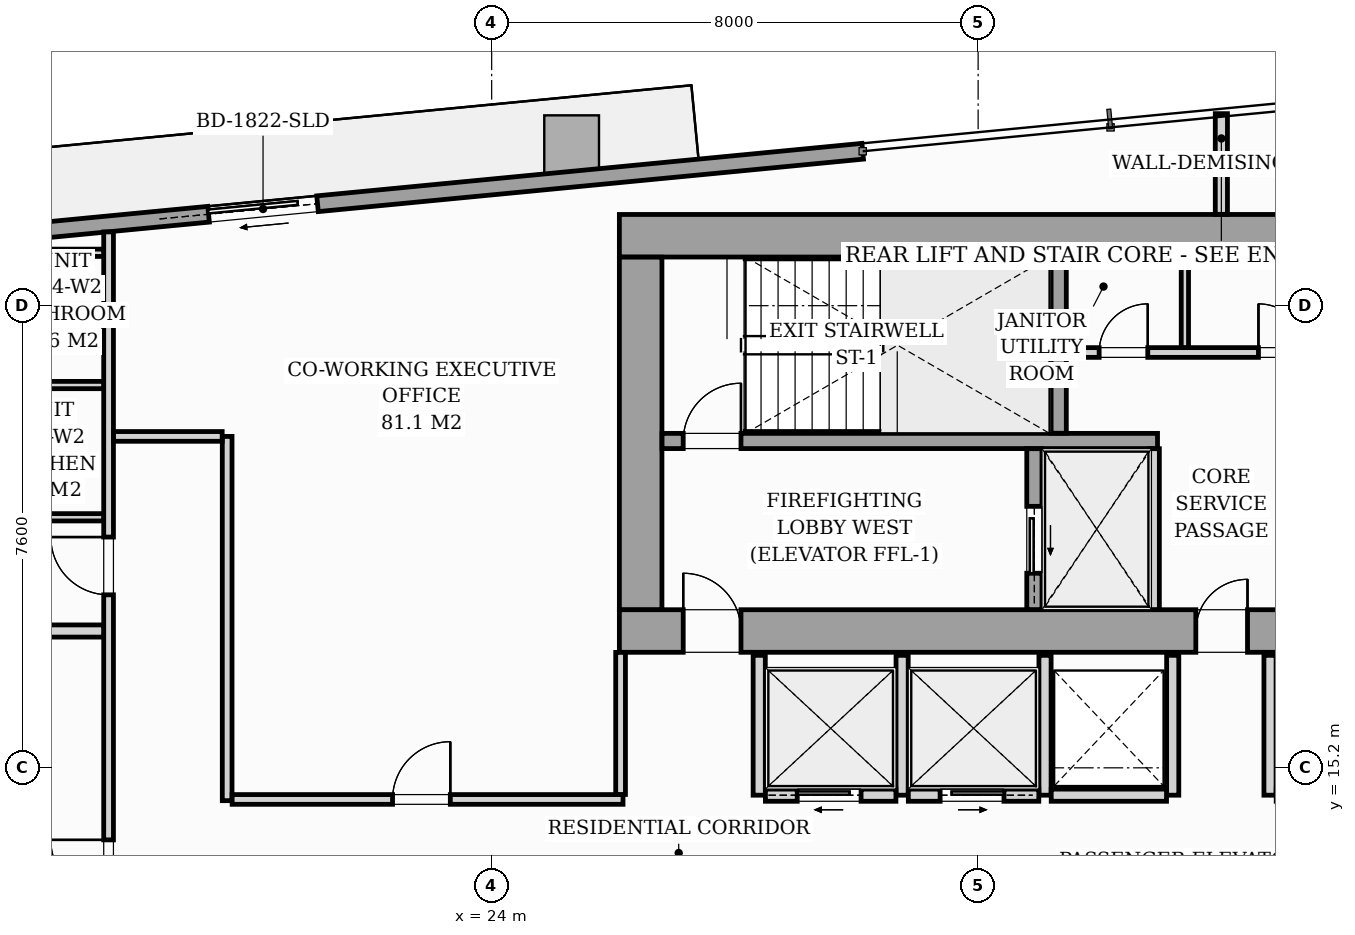
"""IFC4 building model, lengths in metres.
Left out: names, types, materials, properties, quantities, classifications, styles, units other than length and angle.
Written with IfcOpenShell. Run it as: python <this file> out.ifc"""

import sys

from ifc_helpers import new_model, si_unit, direction, frame, frame_2d, origin, origin_2d, place, context, subcontext, project, spatial, rectangle, i_section, extrude, source, transform, mapped, element, fill, save


model = new_model("IFC4")
c1 = context("Model", 3, precision=1e-05, world=origin(), true_north=direction((0.0, 1.0)))
c2 = subcontext(c1, "Body", "Model", "MODEL_VIEW")
j1 = project(units=[si_unit("LENGTHUNIT", "METRE"), si_unit("PLANEANGLEUNIT", "RADIAN")], contexts=[c1])
p1 = place(None, origin())
s1 = spatial("IfcSite", under=j1, at=p1, CompositionType="ELEMENT")
p2 = place(p1, origin())
s2 = spatial("IfcBuilding", under=s1, at=p2, CompositionType="ELEMENT")
p3 = place(p2, frame((0.0, 0.0, 87.4)))
s3 = spatial("IfcBuildingStorey", under=s2, at=p3, CompositionType="ELEMENT", Elevation=87.4)
m1 = source(origin(), c2, "Body", "SweptSolid", [
    extrude(i_section(OverallWidth=0.427, OverallDepth=0.483, WebThickness=0.051, FlangeThickness=0.082, FilletRadius=0.018, at=origin_2d()), origin(), (0.0, 0.0, 1.0), 3.196),
])
for number, where, z_axis, x_axis in (
    (1, (26.4, 17.4, 0.002), (0.0, 0.0, 1.0), (1.0, 0.0, 0.0)),
    (2, (33.12, 17.4, 0.002), (0.0, 0.0, 1.0), (1.0, 0.0, 0.0)),
    (3, (26.4, 24.0, 0.002), (0.0, 0.0, 1.0), (1.0, 0.0, 0.0)),
    (4, (33.12, 24.0, 0.002), (0.0, 0.0, 1.0), (1.0, 0.0, 0.0)),
):
    element("IfcColumn", number, at=place(p3, frame(where, z_axis=z_axis, x_axis=x_axis)), inside=s3, PredefinedType="PILASTER", context=c2, shape_type="MappedRepresentation", body=[
        mapped(m1, transform((0.0, 0.0, 0.0), scale=1.0)),
    ])
m2 = source(origin(), c2, "Body", "SweptSolid", [
    extrude(rectangle(XDim=0.9, YDim=1.1, at=origin_2d()), origin(), (0.0, 0.0, 1.0), 3.196),
])
p4 = place(p3, frame((25.315, 25.38, 0.002), z_axis=(0.0, 0.0, 1.0), x_axis=(0.995396198367, 0.09584575252, 0.0)))
e5 = element("IfcColumn", 5, at=p4, inside=s3, PredefinedType="COLUMN", context=c2, shape_type="MappedRepresentation", body=[
    mapped(m2, transform((0.0, 0.0, 0.0), scale=1.0)),
])
p5 = place(p3, frame((11.08, 23.508, 0.0), z_axis=(0.0, 0.0, 1.0), x_axis=(0.995396638587, 0.095841180552, 0.0)))
e6 = element("IfcWall", 6, at=p5, inside=s3, PredefinedType="STANDARD", context=c2, shape_type="SweptSolid", body=[
    extrude(rectangle(XDim=19.11, YDim=0.26, at=frame_2d((9.555, 0.0))), origin(), (0.0, 0.0, 1.0), 2.94),
])
p6 = place(p5, frame((8.303, 0.0, 0.0)))
e7 = element("IfcOpeningElement", 7, at=p6, cuts=e6, PredefinedType="OPENING", context=c2, shape_type="SweptSolid", body=[
    extrude(rectangle(XDim=1.8, YDim=2.06, at=frame_2d((0.9, 1.03))), frame((0.0, 0.14, 0.0), z_axis=(0.0, -1.0, 0.0), x_axis=(1.0, 0.0, 0.0)), (0.0, 0.0, 1.0), 0.28),
])
p7 = place(p5, frame((2.05, 0.0, 0.65)))
e8 = element("IfcOpeningElement", 8, at=p7, cuts=e6, PredefinedType="OPENING", context=c2, shape_type="SweptSolid", body=[
    extrude(rectangle(XDim=1.6, YDim=1.5, at=frame_2d((0.8, 0.75))), frame((0.0, 0.14, 0.0), z_axis=(0.0, -1.0, 0.0), x_axis=(1.0, 0.0, 0.0)), (0.0, 0.0, 1.0), 0.28),
])
p8 = place(p3, frame((26.1, 17.45, 0.0), z_axis=(0.0, 0.0, 1.0), x_axis=(1.0, 0.0, 0.0)))
e9 = element("IfcWall", 9, at=p8, inside=s3, PredefinedType="SHEAR", context=c2, shape_type="SweptSolid", body=[
    extrude(rectangle(XDim=19.8, YDim=0.7, at=frame_2d((9.9, 0.0))), origin(), (0.0, 0.0, 1.0), 3.2),
])
p9 = place(p8, frame((1.05, 0.0, 0.0)))
e10 = element("IfcOpeningElement", 10, at=p9, cuts=e9, PredefinedType="OPENING", context=c2, shape_type="SweptSolid", body=[
    extrude(rectangle(XDim=0.95, YDim=2.06, at=frame_2d((0.475, 1.03))), frame((0.0, 0.36, 0.0), z_axis=(0.0, -1.0, 0.0), x_axis=(1.0, 0.0, 0.0)), (0.0, 0.0, 1.0), 0.72),
])
p10 = place(p8, frame((9.48, 0.0, 0.0)))
e11 = element("IfcOpeningElement", 11, at=p10, cuts=e9, PredefinedType="OPENING", context=c2, shape_type="SweptSolid", body=[
    extrude(rectangle(XDim=0.85, YDim=2.0, at=frame_2d((0.425, 1.0))), frame((0.0, 0.36, 0.0), z_axis=(0.0, -1.0, 0.0), x_axis=(1.0, 0.0, 0.0)), (0.0, 0.0, 1.0), 0.72),
])
p11 = place(p8, frame((17.65, 0.0, 0.0)))
e12 = element("IfcOpeningElement", 12, at=p11, cuts=e9, PredefinedType="OPENING", context=c2, shape_type="SweptSolid", body=[
    extrude(rectangle(XDim=0.95, YDim=2.06, at=frame_2d((0.475, 1.03))), frame((0.0, 0.36, 0.0), z_axis=(0.0, -1.0, 0.0), x_axis=(1.0, 0.0, 0.0)), (0.0, 0.0, 1.0), 0.72),
])
p12 = place(p3, frame((26.1, 23.95, 0.0), z_axis=(0.0, 0.0, 1.0), x_axis=(1.0, 0.0, 0.0)))
e13 = element("IfcWall", 13, at=p12, inside=s3, PredefinedType="SHEAR", context=c2, shape_type="SweptSolid", body=[
    extrude(rectangle(XDim=19.8, YDim=0.7, at=frame_2d((9.9, 0.0))), origin(), (0.0, 0.0, 1.0), 3.2),
])
p13 = place(p3, frame((26.45, 17.802, 0.0), z_axis=(0.0, 0.0, 1.0), x_axis=(0.0, 1.0, 0.0)))
e14 = element("IfcWall", 14, at=p13, inside=s3, PredefinedType="SHEAR", context=c2, shape_type="SweptSolid", body=[
    extrude(rectangle(XDim=5.796, YDim=0.7, at=frame_2d((2.898, 0.0))), origin(), (0.0, 0.0, 1.0), 3.2),
])
p14 = place(p3, frame((26.802, 20.575, 0.0), z_axis=(0.0, 0.0, 1.0), x_axis=(1.0, 0.0, 0.0)))
e15 = element("IfcWall", 15, at=p14, inside=s3, PredefinedType="SOLIDWALL", context=c2, shape_type="SweptSolid", body=[
    extrude(rectangle(XDim=8.148, YDim=0.25, at=frame_2d((4.074, 0.0))), origin(), (0.0, 0.0, 1.0), 3.2),
])
p15 = place(p14, frame((0.348, 0.0, 0.0)))
e16 = element("IfcOpeningElement", 16, at=p15, cuts=e15, PredefinedType="OPENING", context=c2, shape_type="SweptSolid", body=[
    extrude(rectangle(XDim=0.95, YDim=2.06, at=frame_2d((0.475, 1.03))), frame((0.0, 0.135, 0.0), z_axis=(0.0, -1.0, 0.0), x_axis=(1.0, 0.0, 0.0)), (0.0, 0.0, 1.0), 0.27),
])
p16 = place(p3, frame((33.325, 20.702, 0.0), z_axis=(0.0, 0.0, 1.0), x_axis=(0.0, 1.0, 0.0)))
e17 = element("IfcWall", 17, at=p16, inside=s3, PredefinedType="SOLIDWALL", context=c2, shape_type="SweptSolid", body=[
    extrude(rectangle(XDim=2.896, YDim=0.25, at=frame_2d((1.448, 0.0))), origin(), (0.0, 0.0, 1.0), 3.2),
])
p17 = place(p3, frame((32.925, 17.802, 0.0), z_axis=(0.0, 0.0, 1.0), x_axis=(0.0, 1.0, 0.0)))
e18 = element("IfcWall", 18, at=p17, inside=s3, PredefinedType="SOLIDWALL", context=c2, shape_type="SweptSolid", body=[
    extrude(rectangle(XDim=2.646, YDim=0.25, at=frame_2d((1.323, 0.0))), origin(), (0.0, 0.0, 1.0), 3.2),
])
p18 = place(p17, frame((0.598, 0.0, 0.0)))
e19 = element("IfcOpeningElement", 19, at=p18, cuts=e18, PredefinedType="OPENING", context=c2, shape_type="SweptSolid", body=[
    extrude(rectangle(XDim=1.1, YDim=2.08, at=frame_2d((0.55, 1.04))), frame((0.0, 0.135, 0.0), z_axis=(0.0, -1.0, 0.0), x_axis=(1.0, 0.0, 0.0)), (0.0, 0.0, 1.0), 0.27),
])
p19 = place(p3, frame((34.9, 17.802, 0.0), z_axis=(0.0, 0.0, 1.0), x_axis=(0.0, 1.0, 0.0)))
e20 = element("IfcWall", 20, at=p19, inside=s3, PredefinedType="PARTITIONING", context=c2, shape_type="SweptSolid", body=[
    extrude(rectangle(XDim=2.646, YDim=0.16, at=frame_2d((1.323, 0.0))), origin(), (0.0, 0.0, 1.0), 2.94),
])
p20 = place(p3, frame((33.452, 22.03, 0.0), z_axis=(0.0, 0.0, 1.0), x_axis=(1.0, 0.0, 0.0)))
e21 = element("IfcWall", 21, at=p20, inside=s3, PredefinedType="PARTITIONING", context=c2, shape_type="SweptSolid", body=[
    extrude(rectangle(XDim=5.096, YDim=0.16, at=frame_2d((2.548, 0.0))), origin(), (0.0, 0.0, 1.0), 2.94),
])
p21 = place(p20, frame((0.538, 0.0, 0.0)))
e22 = element("IfcOpeningElement", 22, at=p21, cuts=e21, PredefinedType="OPENING", context=c2, shape_type="SweptSolid", body=[
    extrude(rectangle(XDim=0.8, YDim=2.05, at=frame_2d((0.4, 1.025))), frame((0.0, 0.09, 0.0), z_axis=(0.0, -1.0, 0.0), x_axis=(1.0, 0.0, 0.0)), (0.0, 0.0, 1.0), 0.18),
])
p22 = place(p20, frame((3.158, 0.0, 0.0)))
e23 = element("IfcOpeningElement", 23, at=p22, cuts=e21, PredefinedType="OPENING", context=c2, shape_type="SweptSolid", body=[
    extrude(rectangle(XDim=0.8, YDim=2.05, at=frame_2d((0.4, 1.025))), frame((0.0, 0.09, 0.0), z_axis=(0.0, -1.0, 0.0), x_axis=(1.0, 0.0, 0.0)), (0.0, 0.0, 1.0), 0.18),
])
p23 = place(p3, frame((35.4, 22.112, 0.0), z_axis=(0.0, 0.0, 1.0), x_axis=(0.0, 1.0, 0.0)))
e24 = element("IfcWall", 24, at=p23, inside=s3, PredefinedType="PARTITIONING", context=c2, shape_type="SweptSolid", body=[
    extrude(rectangle(XDim=1.486, YDim=0.12, at=frame_2d((0.743, 0.0))), origin(), (0.0, 0.0, 1.0), 2.94),
])
for number, where, z_axis, x_axis in (
    (25, (28.4, 14.75, 0.0), (0.0, 0.0, 1.0), (0.0, 1.0, 0.0)),
    (26, (30.75, 14.75, 0.0), (0.0, 0.0, 1.0), (0.0, 1.0, 0.0)),
    (27, (33.1, 14.75, 0.0), (0.0, 0.0, 1.0), (0.0, 1.0, 0.0)),
):
    element("IfcWall", number, at=place(p3, frame(where, z_axis=z_axis, x_axis=x_axis)), inside=s3, PredefinedType="PARTITIONING", context=c2, shape_type="SweptSolid", body=[
        extrude(rectangle(XDim=2.3, YDim=0.2, at=frame_2d((1.15, 0.0))), origin(), (0.0, 0.0, 1.0), 2.94),
    ])
p24 = place(p3, frame((28.502, 14.75, 0.0), z_axis=(0.0, 0.0, 1.0), x_axis=(1.0, 0.0, 0.0)))
e28 = element("IfcWall", 28, at=p24, inside=s3, PredefinedType="PARTITIONING", context=c2, shape_type="SweptSolid", body=[
    extrude(rectangle(XDim=2.146, YDim=0.2, at=frame_2d((1.073, 0.0))), origin(), (0.0, 0.0, 1.0), 2.94),
])
p25 = place(p24, frame((0.523, 0.0, 0.0)))
e29 = element("IfcOpeningElement", 29, at=p25, cuts=e28, PredefinedType="OPENING", context=c2, shape_type="SweptSolid", body=[
    extrude(rectangle(XDim=1.05, YDim=2.08, at=frame_2d((0.525, 1.04))), frame((0.0, 0.11, 0.0), z_axis=(0.0, -1.0, 0.0), x_axis=(1.0, 0.0, 0.0)), (0.0, 0.0, 1.0), 0.22),
])
p26 = place(p3, frame((30.852, 14.75, 0.0), z_axis=(0.0, 0.0, 1.0), x_axis=(1.0, 0.0, 0.0)))
e30 = element("IfcWall", 30, at=p26, inside=s3, PredefinedType="PARTITIONING", context=c2, shape_type="SweptSolid", body=[
    extrude(rectangle(XDim=2.146, YDim=0.2, at=frame_2d((1.073, 0.0))), origin(), (0.0, 0.0, 1.0), 2.94),
])
p27 = place(p26, frame((0.523, 0.0, 0.0)))
e31 = element("IfcOpeningElement", 31, at=p27, cuts=e30, PredefinedType="OPENING", context=c2, shape_type="SweptSolid", body=[
    extrude(rectangle(XDim=1.05, YDim=2.08, at=frame_2d((0.525, 1.04))), frame((0.0, 0.11, 0.0), z_axis=(0.0, -1.0, 0.0), x_axis=(1.0, 0.0, 0.0)), (0.0, 0.0, 1.0), 0.22),
])
p28 = place(p3, frame((35.2, 14.75, 0.0), z_axis=(0.0, 0.0, 1.0), x_axis=(0.0, 1.0, 0.0)))
e32 = element("IfcWall", 32, at=p28, inside=s3, PredefinedType="PARTITIONING", context=c2, shape_type="SweptSolid", body=[
    extrude(rectangle(XDim=2.3, YDim=0.2, at=frame_2d((1.15, 0.0))), origin(), (0.0, 0.0, 1.0), 2.94),
])
p29 = place(p3, frame((33.202, 14.75, 0.0), z_axis=(0.0, 0.0, 1.0), x_axis=(1.0, 0.0, 0.0)))
e33 = element("IfcWall", 33, at=p29, inside=s3, PredefinedType="PARTITIONING", context=c2, shape_type="SweptSolid", body=[
    extrude(rectangle(XDim=1.896, YDim=0.2, at=frame_2d((0.948, 0.0))), origin(), (0.0, 0.0, 1.0), 2.94),
])
p30 = place(p3, frame((36.8, 14.75, 0.0), z_axis=(0.0, 0.0, 1.0), x_axis=(0.0, 1.0, 0.0)))
e34 = element("IfcWall", 34, at=p30, inside=s3, PredefinedType="PARTITIONING", context=c2, shape_type="SweptSolid", body=[
    extrude(rectangle(XDim=2.3, YDim=0.2, at=frame_2d((1.15, 0.0))), origin(), (0.0, 0.0, 1.0), 2.94),
])
p31 = place(p3, frame((17.7, 12.572, 0.0), z_axis=(0.0, 0.0, 1.0), x_axis=(0.0, 1.0, 0.0)))
e35 = element("IfcWall", 35, at=p31, inside=s3, PredefinedType="PARTITIONING", context=c2, shape_type="SweptSolid", body=[
    extrude(rectangle(XDim=11.441, YDim=0.16, at=frame_2d((5.72, 0.0))), origin(), (0.0, 0.0, 1.0), 2.94),
])
p32 = place(p31, frame((0.493, 0.0, 0.0)))
e36 = element("IfcOpeningElement", 36, at=p32, cuts=e35, PredefinedType="OPENING", context=c2, shape_type="SweptSolid", body=[
    extrude(rectangle(XDim=0.95, YDim=2.06, at=frame_2d((0.475, 1.03))), frame((0.0, 0.09, 0.0), z_axis=(0.0, -1.0, 0.0), x_axis=(1.0, 0.0, 0.0)), (0.0, 0.0, 1.0), 0.18),
])
p33 = place(p31, frame((5.473, 0.0, 0.0)))
e37 = element("IfcOpeningElement", 37, at=p33, cuts=e35, PredefinedType="OPENING", context=c2, shape_type="SweptSolid", body=[
    extrude(rectangle(XDim=0.95, YDim=2.06, at=frame_2d((0.475, 1.03))), frame((0.0, 0.09, 0.0), z_axis=(0.0, -1.0, 0.0), x_axis=(1.0, 0.0, 0.0)), (0.0, 0.0, 1.0), 0.18),
])
p34 = place(p3, frame((36.0, 24.302, 0.0), z_axis=(0.0, 0.0, 1.0), x_axis=(0.0, 1.0, 0.0)))
e38 = element("IfcWall", 38, at=p34, inside=s3, PredefinedType="PARTITIONING", context=c2, shape_type="SweptSolid", body=[
    extrude(rectangle(XDim=1.656, YDim=0.2, at=frame_2d((0.828, 0.0))), origin(), (0.0, 0.0, 1.0), 2.94),
])
p35 = place(p3, frame((9.232, 17.45, 0.0), z_axis=(0.0, 0.0, 1.0), x_axis=(1.0, 0.0, 0.0)))
e39 = element("IfcWall", 39, at=p35, inside=s3, PredefinedType="PARTITIONING", context=c2, shape_type="SweptSolid", body=[
    extrude(rectangle(XDim=8.386, YDim=0.2, at=frame_2d((4.193, 0.0))), origin(), (0.0, 0.0, 1.0), 2.94),
])
for number, where, z_axis, x_axis in (
    (40, (15.362, 21.495, 0.0), (0.0, 0.0, 1.0), (1.0, 0.0, 0.0)),
    (41, (15.362, 19.32, 0.0), (0.0, 0.0, 1.0), (1.0, 0.0, 0.0)),
):
    element("IfcWall", number, at=place(p3, frame(where, z_axis=z_axis, x_axis=x_axis)), inside=s3, PredefinedType="PARTITIONING", context=c2, shape_type="SweptSolid", body=[
        extrude(rectangle(XDim=2.256, YDim=0.12, at=frame_2d((1.128, 0.0))), origin(), (0.0, 0.0, 1.0), 2.94),
    ])
p36 = place(p3, frame((15.362, 23.67, 0.0), z_axis=(0.0, 0.0, 1.0), x_axis=(1.0, 0.0, 0.0)))
e42 = element("IfcWall", 42, at=p36, inside=s3, PredefinedType="PARTITIONING", context=c2, shape_type="SweptSolid", body=[
    extrude(rectangle(XDim=2.256, YDim=0.12, at=frame_2d((1.128, 0.0))), origin(), (0.0, 0.0, 1.0), 2.31),
])
p37 = place(p3, frame((19.65, 14.66, 0.0), z_axis=(0.0, 0.0, 1.0), x_axis=(0.0, 1.0, 0.0)))
e43 = element("IfcWall", 43, at=p37, inside=s3, PredefinedType="PARTITIONING", context=c2, shape_type="SweptSolid", body=[
    extrude(rectangle(XDim=5.99, YDim=0.16, at=frame_2d((2.995, 0.0))), origin(), (0.0, 0.0, 1.0), 2.94),
])
p38 = place(p3, frame((17.782, 20.65, 0.0), z_axis=(0.0, 0.0, 1.0), x_axis=(1.0, 0.0, 0.0)))
e44 = element("IfcWall", 44, at=p38, inside=s3, PredefinedType="PARTITIONING", context=c2, shape_type="SweptSolid", body=[
    extrude(rectangle(XDim=1.786, YDim=0.16, at=frame_2d((0.893, 0.0))), origin(), (0.0, 0.0, 1.0), 2.94),
])
p39 = place(p3, frame((19.732, 14.68, 0.0), z_axis=(0.0, 0.0, 1.0), x_axis=(1.0, 0.0, 0.0)))
e45 = element("IfcWall", 45, at=p39, inside=s3, PredefinedType="PARTITIONING", context=c2, shape_type="SweptSolid", body=[
    extrude(rectangle(XDim=6.428, YDim=0.16, at=frame_2d((3.214, 0.0))), origin(), (0.0, 0.0, 1.0), 2.94),
])
p40 = place(p39, frame((2.638, 0.0, 0.0)))
e46 = element("IfcOpeningElement", 46, at=p40, cuts=e45, PredefinedType="OPENING", context=c2, shape_type="SweptSolid", body=[
    extrude(rectangle(XDim=0.95, YDim=2.06, at=frame_2d((0.475, 1.03))), frame((0.0, 0.09, 0.0), z_axis=(0.0, -1.0, 0.0), x_axis=(1.0, 0.0, 0.0)), (0.0, 0.0, 1.0), 0.18),
])
p41 = place(p3, frame((26.12, 14.762, 0.0), z_axis=(0.0, 0.0, 1.0), x_axis=(0.0, 1.0, 0.0)))
e47 = element("IfcWall", 47, at=p41, inside=s3, PredefinedType="PARTITIONING", context=c2, shape_type="SweptSolid", body=[
    extrude(rectangle(XDim=2.336, YDim=0.16, at=frame_2d((1.168, 0.0))), origin(), (0.0, 0.0, 1.0), 2.94),
])
m3 = source(origin(), c2, "Body", "SweptSolid", [
    extrude(rectangle(XDim=1.8, YDim=2.06, at=frame_2d((0.9, 1.03))), frame((0.0, 0.025, 0.0), z_axis=(0.0, -1.0, 0.0), x_axis=(1.0, 0.0, 0.0)), (0.0, 0.0, 1.0), 0.05),
])
p42 = place(p6, origin())
e48 = element("IfcDoor", 48, at=p42, inside=s3, OperationType="SLIDING_TO_LEFT", PredefinedType="DOOR", context=c2, shape_type="MappedRepresentation", body=[
    mapped(m3, transform((0.0, 0.0, 0.0), scale=1.0)),
])
fill(e7, e48)
m4 = source(origin(), c2, "Body", "SweptSolid", [
    extrude(rectangle(XDim=0.95, YDim=2.06, at=frame_2d((0.475, 1.03))), frame((0.0, 0.025, 0.0), z_axis=(0.0, -1.0, 0.0), x_axis=(1.0, 0.0, 0.0)), (0.0, 0.0, 1.0), 0.05),
])
p43 = place(p9, origin())
e49 = element("IfcDoor", 49, at=p43, inside=s3, OperationType="SINGLE_SWING_LEFT", PredefinedType="DOOR", context=c2, shape_type="MappedRepresentation", body=[
    mapped(m4, transform((0.0, 0.0, 0.0), scale=1.0)),
])
fill(e10, e49)
m5 = source(origin(), c2, "Body", "SweptSolid", [
    extrude(rectangle(XDim=0.85, YDim=2.0, at=frame_2d((0.425, 1.0))), frame((0.0, 0.025, 0.0), z_axis=(0.0, -1.0, 0.0), x_axis=(1.0, 0.0, 0.0)), (0.0, 0.0, 1.0), 0.05),
])
p44 = place(p10, origin())
e50 = element("IfcDoor", 50, at=p44, inside=s3, OperationType="SINGLE_SWING_RIGHT", PredefinedType="DOOR", context=c2, shape_type="MappedRepresentation", body=[
    mapped(m5, transform((0.0, 0.0, 0.0), scale=1.0)),
])
fill(e11, e50)
p45 = place(p15, origin())
e51 = element("IfcDoor", 51, at=p45, inside=s3, OperationType="SINGLE_SWING_RIGHT", PredefinedType="DOOR", context=c2, shape_type="MappedRepresentation", body=[
    mapped(m4, transform((0.0, 0.0, 0.0), scale=1.0)),
])
fill(e16, e51)
m6 = source(origin(), c2, "Body", "SweptSolid", [
    extrude(rectangle(XDim=1.1, YDim=2.08, at=frame_2d((0.55, 1.04))), frame((0.0, 0.025, 0.0), z_axis=(0.0, -1.0, 0.0), x_axis=(1.0, 0.0, 0.0)), (0.0, 0.0, 1.0), 0.05),
])
p46 = place(p18, origin())
e52 = element("IfcDoor", 52, at=p46, inside=s3, OperationType="SLIDING_TO_LEFT", PredefinedType="DOOR", context=c2, shape_type="MappedRepresentation", body=[
    mapped(m6, transform((0.0, 0.0, 0.0), scale=1.0)),
])
fill(e19, e52)
m7 = source(origin(), c2, "Body", "SweptSolid", [
    extrude(rectangle(XDim=0.8, YDim=2.05, at=frame_2d((0.4, 1.025))), frame((0.0, 0.025, 0.0), z_axis=(0.0, -1.0, 0.0), x_axis=(1.0, 0.0, 0.0)), (0.0, 0.0, 1.0), 0.05),
])
p47 = place(p21, origin())
e53 = element("IfcDoor", 53, at=p47, inside=s3, OperationType="SINGLE_SWING_RIGHT", PredefinedType="DOOR", context=c2, shape_type="MappedRepresentation", body=[
    mapped(m7, transform((0.0, 0.0, 0.0), scale=1.0)),
])
fill(e22, e53)
p48 = place(p22, origin())
e54 = element("IfcDoor", 54, at=p48, inside=s3, OperationType="SINGLE_SWING_LEFT", PredefinedType="DOOR", context=c2, shape_type="MappedRepresentation", body=[
    mapped(m7, transform((0.0, 0.0, 0.0), scale=1.0)),
])
fill(e23, e54)
m8 = source(origin(), c2, "Body", "SweptSolid", [
    extrude(rectangle(XDim=1.05, YDim=2.08, at=frame_2d((0.525, 1.04))), frame((0.0, 0.025, 0.0), z_axis=(0.0, -1.0, 0.0), x_axis=(1.0, 0.0, 0.0)), (0.0, 0.0, 1.0), 0.05),
])
p49 = place(p25, origin())
e55 = element("IfcDoor", 55, at=p49, inside=s3, OperationType="SLIDING_TO_LEFT", PredefinedType="DOOR", context=c2, shape_type="MappedRepresentation", body=[
    mapped(m8, transform((0.0, 0.0, 0.0), scale=1.0)),
])
fill(e29, e55)
p50 = place(p27, origin())
e56 = element("IfcDoor", 56, at=p50, inside=s3, OperationType="SLIDING_TO_RIGHT", PredefinedType="DOOR", context=c2, shape_type="MappedRepresentation", body=[
    mapped(m8, transform((0.0, 0.0, 0.0), scale=1.0)),
])
fill(e31, e56)
m9 = source(origin(), c2, "Body", "SweptSolid", [
    extrude(rectangle(XDim=0.95, YDim=2.06, at=frame_2d((0.475, 1.03))), frame((0.0, 0.025, 0.0), z_axis=(0.0, -1.0, 0.0), x_axis=(1.0, 0.0, 0.0)), (0.0, 0.0, 1.0), 0.05),
])
p51 = place(p32, origin())
e57 = element("IfcDoor", 57, at=p51, inside=s3, OperationType="SINGLE_SWING_RIGHT", PredefinedType="DOOR", context=c2, shape_type="MappedRepresentation", body=[
    mapped(m9, transform((0.0, 0.0, 0.0), scale=1.0)),
])
fill(e36, e57)
p52 = place(p33, origin())
e58 = element("IfcDoor", 58, at=p52, inside=s3, OperationType="SINGLE_SWING_RIGHT", PredefinedType="DOOR", context=c2, shape_type="MappedRepresentation", body=[
    mapped(m9, transform((0.0, 0.0, 0.0), scale=1.0)),
])
fill(e37, e58)
p53 = place(p40, origin())
e59 = element("IfcDoor", 59, at=p53, inside=s3, OperationType="SINGLE_SWING_RIGHT", PredefinedType="DOOR", context=c2, shape_type="MappedRepresentation", body=[
    mapped(m9, transform((0.0, 0.0, 0.0), scale=1.0)),
])
fill(e46, e59)
save(model, sys.argv[1])
